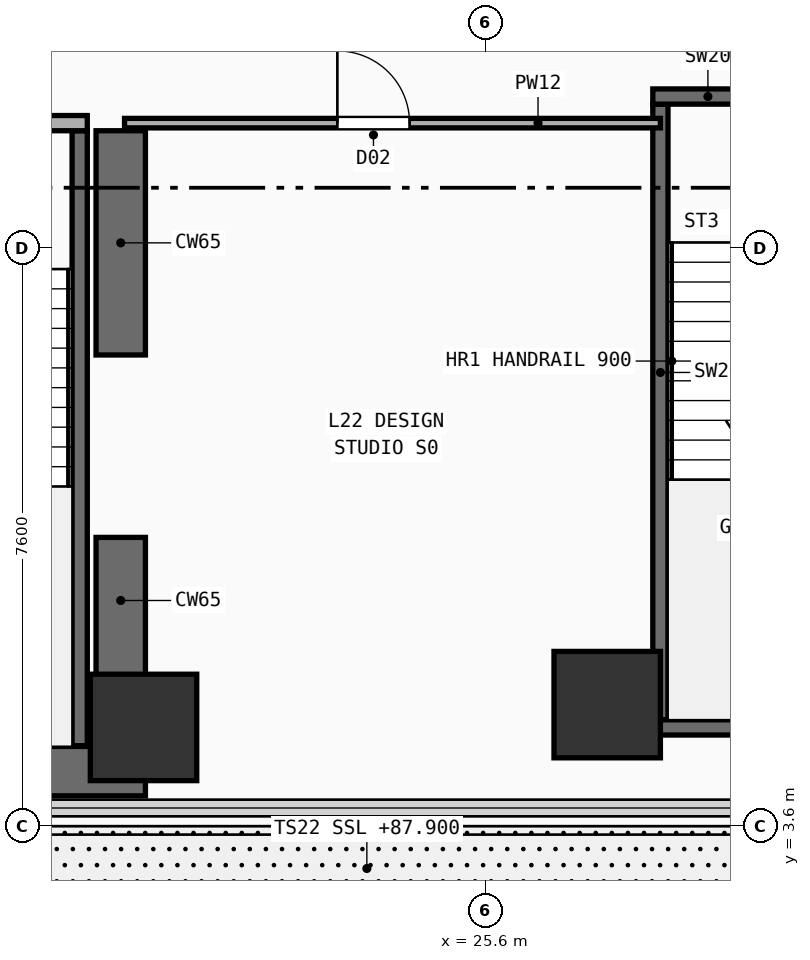
"""IFC4 building model, lengths in metres.
Left out: names, types, materials, properties, quantities, classifications, styles, units other than length and angle.
Written with IfcOpenShell. Run it as: python <this file> out.ifc"""

import sys

from ifc_helpers import new_model, si_unit, direction, frame, frame_2d, origin, origin_2d, place, context, subcontext, project, spatial, rectangle, extrude, element, fill, save


model = new_model("IFC4")
c1 = context("Model", 3, precision=1e-05, world=origin(), true_north=direction((0.0, 1.0)))
c2 = subcontext(c1, "Body", "Model", "MODEL_VIEW")
j1 = project(units=[si_unit("LENGTHUNIT", "METRE"), si_unit("PLANEANGLEUNIT", "RADIAN")], contexts=[c1])
p1 = place(None, origin())
s1 = spatial("IfcSite", under=j1, at=p1, CompositionType="ELEMENT")
p2 = place(p1, origin())
s2 = spatial("IfcBuilding", under=s1, at=p2, CompositionType="ELEMENT")
p3 = place(p2, frame((0.0, 0.0, 87.9)))
s3 = spatial("IfcBuildingStorey", under=s2, at=p3, CompositionType="ELEMENT", Elevation=87.9)
p4 = place(p3, frame((7.125, 4.325, 0.0), z_axis=(0.0, 0.0, 1.0), x_axis=(1.0, 0.0, 0.0)))
e1 = element("IfcWall", 1, at=p4, inside=s3, PredefinedType="SHEAR", context=c2, shape_type="SweptSolid", body=[
    extrude(rectangle(XDim=14.0, YDim=0.65, at=frame_2d((7.0, 0.0))), origin(), (0.0, 0.0, 1.0), 3.54),
])
p5 = place(p3, frame((20.8, 4.65, 0.0), z_axis=(0.0, 0.0, 1.0), x_axis=(0.0, 1.0, 0.0)))
e2 = element("IfcWall", 2, at=p5, inside=s3, PredefinedType="SHEAR", context=c2, shape_type="SweptSolid", body=[
    extrude(rectangle(XDim=2.75, YDim=0.65, at=frame_2d((1.375, 0.0))), origin(), (0.0, 0.0, 1.0), 3.54),
])
p6 = place(p3, frame((20.8, 9.8, 0.0), z_axis=(0.0, 0.0, 1.0), x_axis=(0.0, 1.0, 0.0)))
e3 = element("IfcWall", 3, at=p6, inside=s3, PredefinedType="SHEAR", context=c2, shape_type="SweptSolid", body=[
    extrude(rectangle(XDim=2.95, YDim=0.65, at=frame_2d((1.475, 0.0))), origin(), (0.0, 0.0, 1.0), 3.54),
])
for number, where, z_axis, x_axis in (
    (4, (21.1, 4.9, 0.0), (0.0, 0.0, 1.0), (1.0, 0.0, 0.0)),
    (5, (27.2, 5.2, 0.0), (0.0, 0.0, 1.0), (1.0, 0.0, 0.0)),
):
    element("IfcColumn", number, at=place(p3, frame(where, z_axis=z_axis, x_axis=x_axis)), inside=s3, PredefinedType="COLUMN", context=c2, shape_type="SweptSolid", body=[
        extrude(rectangle(XDim=1.4, YDim=1.4, at=origin_2d()), origin(), (0.0, 0.0, 1.0), 3.54),
    ])
p7 = place(p3, frame((20.26, 4.66, 0.0), z_axis=(0.0, 0.0, 1.0), x_axis=(0.0, 1.0, 0.0)))
e6 = element("IfcWall", 6, at=p7, inside=s3, PredefinedType="SHEAR", context=c2, shape_type="SweptSolid", body=[
    extrude(rectangle(XDim=8.09, YDim=0.2, at=frame_2d((4.045, 0.0))), origin(), (0.0, 0.0, 1.0), 3.54),
])
p8 = place(p3, frame((16.4, 12.85, 0.0), z_axis=(0.0, 0.0, 1.0), x_axis=(1.0, 0.0, 0.0)))
e7 = element("IfcWall", 7, at=p8, inside=s3, PredefinedType="PARTITIONING", context=c2, shape_type="SweptSolid", body=[
    extrude(rectangle(XDim=3.96, YDim=0.2, at=frame_2d((1.98, 0.0))), origin(), (0.0, 0.0, 1.0), 3.54),
])
p9 = place(p8, frame((1.304, 0.0, 0.0)))
e8 = element("IfcOpeningElement", 8, at=p9, cuts=e7, PredefinedType="OPENING", context=c2, shape_type="SweptSolid", body=[
    extrude(rectangle(XDim=1.1, YDim=2.2, at=frame_2d((0.55, 1.1))), frame((0.0, 0.11, 0.0), z_axis=(0.0, -1.0, 0.0), x_axis=(1.0, 0.0, 0.0)), (0.0, 0.0, 1.0), 0.22),
])
p10 = place(p3, frame((27.9, 5.0, 0.0), z_axis=(0.0, 0.0, 1.0), x_axis=(0.0, 1.0, 0.0)))
e9 = element("IfcWall", 9, at=p10, inside=s3, PredefinedType="SHEAR", context=c2, shape_type="SweptSolid", body=[
    extrude(rectangle(XDim=8.1, YDim=0.2, at=frame_2d((4.05, 0.0))), origin(), (0.0, 0.0, 1.0), 3.54),
])
p11 = place(p3, frame((27.8, 4.9, 0.0), z_axis=(0.0, 0.0, 1.0), x_axis=(1.0, 0.0, 0.0)))
e10 = element("IfcWall", 10, at=p11, inside=s3, PredefinedType="SHEAR", context=c2, shape_type="SweptSolid", body=[
    extrude(rectangle(XDim=4.16, YDim=0.2, at=frame_2d((2.08, 0.0))), origin(), (0.0, 0.0, 1.0), 3.54),
])
p12 = place(p3, frame((27.8, 13.2, 0.0), z_axis=(0.0, 0.0, 1.0), x_axis=(1.0, 0.0, 0.0)))
e11 = element("IfcWall", 11, at=p12, inside=s3, PredefinedType="SHEAR", context=c2, shape_type="SweptSolid", body=[
    extrude(rectangle(XDim=4.16, YDim=0.2, at=frame_2d((2.08, 0.0))), origin(), (0.0, 0.0, 1.0), 3.54),
])
p13 = place(p12, frame((1.53, 0.0, 0.0)))
e12 = element("IfcOpeningElement", 12, at=p13, cuts=e11, PredefinedType="OPENING", context=c2, shape_type="SweptSolid", body=[
    extrude(rectangle(XDim=1.1, YDim=2.2, at=frame_2d((0.55, 1.1))), frame((0.0, 0.11, 0.0), z_axis=(0.0, -1.0, 0.0), x_axis=(1.0, 0.0, 0.0)), (0.0, 0.0, 1.0), 0.22),
])
p14 = place(p3, frame((20.85, 12.85, 0.0), z_axis=(0.0, 0.0, 1.0), x_axis=(1.0, 0.0, 0.0)))
e13 = element("IfcWall", 13, at=p14, inside=s3, PredefinedType="PARTITIONING", context=c2, shape_type="SweptSolid", body=[
    extrude(rectangle(XDim=7.05, YDim=0.125, at=frame_2d((3.525, 0.0))), origin(), (0.0, 0.0, 1.0), 3.54),
])
p15 = place(p14, frame((2.8, 0.0, 0.0)))
e14 = element("IfcOpeningElement", 14, at=p15, cuts=e13, PredefinedType="OPENING", context=c2, shape_type="SweptSolid", body=[
    extrude(rectangle(XDim=0.95, YDim=2.15, at=frame_2d((0.475, 1.075))), frame((0.0, 0.073, 0.0), z_axis=(0.0, -1.0, 0.0), x_axis=(1.0, 0.0, 0.0)), (0.0, 0.0, 1.0), 0.145),
])
p16 = place(p15, origin())
e15 = element("IfcDoor", 15, at=p16, inside=s3, OperationType="SINGLE_SWING_LEFT", PredefinedType="DOOR", context=c2, shape_type="SweptSolid", body=[
    extrude(rectangle(XDim=0.95, YDim=2.15, at=frame_2d((0.475, 1.075))), frame((0.0, 0.025, 0.0), z_axis=(0.0, -1.0, 0.0), x_axis=(1.0, 0.0, 0.0)), (0.0, 0.0, 1.0), 0.05),
])
fill(e14, e15)
save(model, sys.argv[1])
